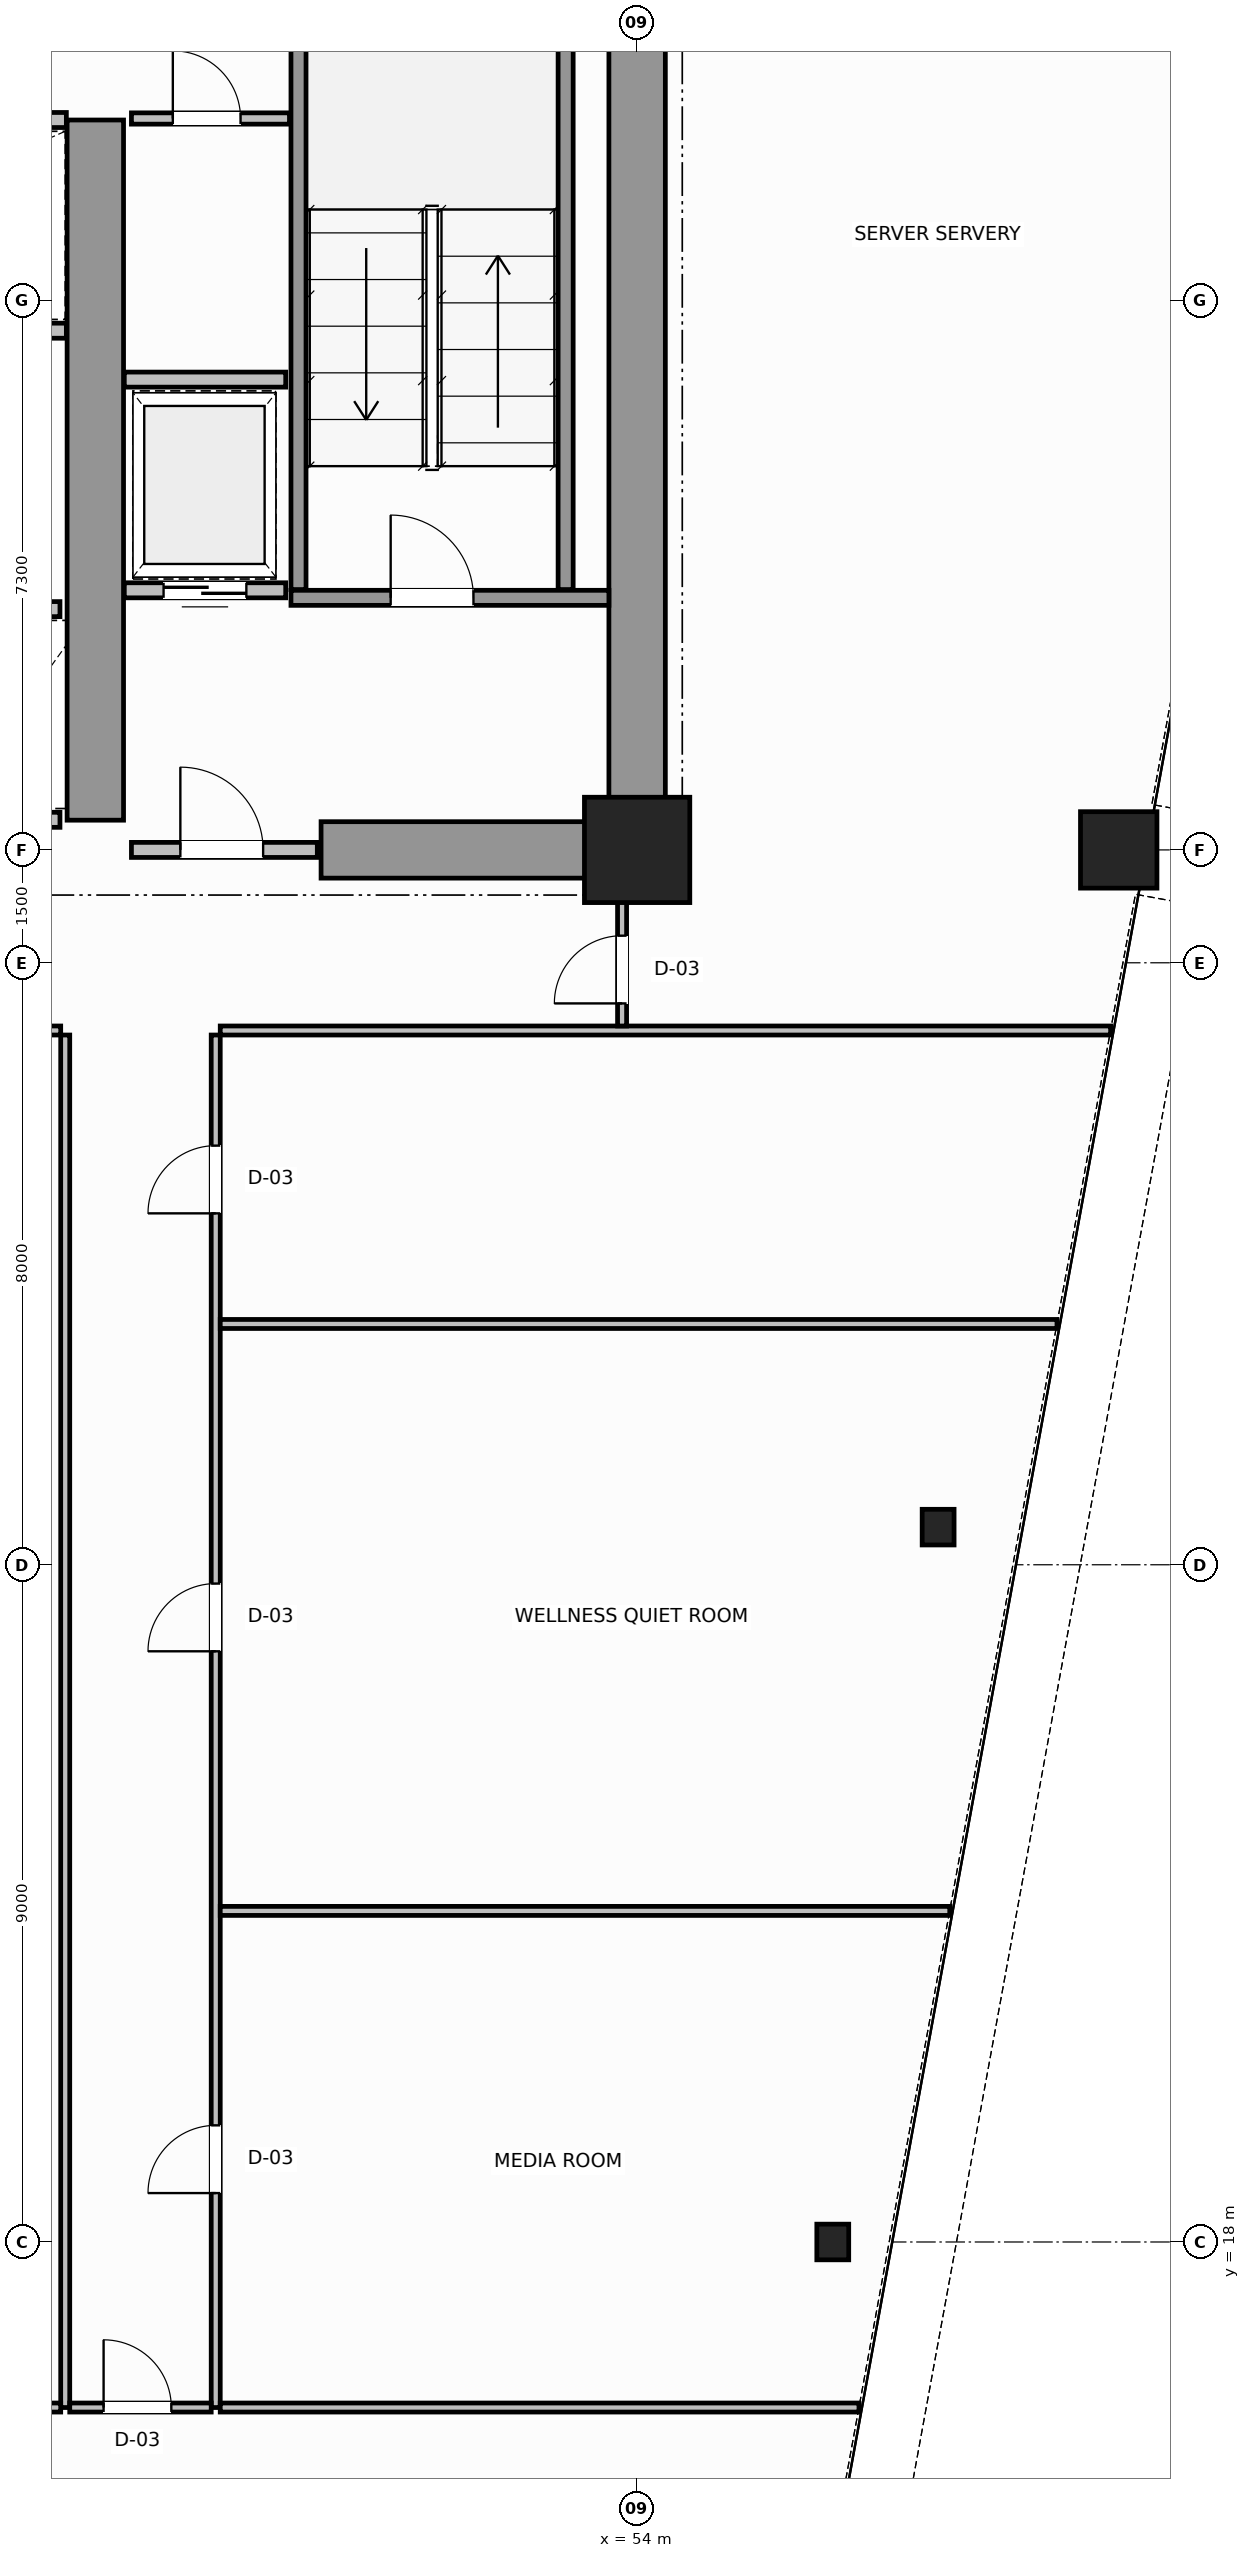
"""IFC4 building model, lengths in metres.
Left out: names, types, materials, properties, quantities, classifications, styles, units other than length and angle.
Written with IfcOpenShell. Run it as: python <this file> out.ifc"""

import sys

from ifc_helpers import new_model, si_unit, direction, frame, frame_2d, origin, origin_2d, place, context, subcontext, project, spatial, rectangle, hollow_circle, i_section, extrude, source, transform, mapped, element, fill, save


model = new_model("IFC4")
c1 = context("Model", 3, precision=1e-05, world=origin(), true_north=direction((0.0, 1.0)))
c2 = subcontext(c1, "Body", "Model", "MODEL_VIEW")
j1 = project(units=[si_unit("LENGTHUNIT", "METRE"), si_unit("PLANEANGLEUNIT", "RADIAN")], contexts=[c1])
p1 = place(None, origin())
s1 = spatial("IfcSite", under=j1, at=p1, CompositionType="ELEMENT")
p2 = place(p1, origin())
s2 = spatial("IfcBuilding", under=s1, at=p2, CompositionType="ELEMENT")
p3 = place(p2, frame((0.0, 0.0, 88.2)))
s3 = spatial("IfcBuildingStorey", under=s2, at=p3, CompositionType="ELEMENT", Elevation=88.2)
m1 = source(origin(), c2, "Body", "SweptSolid", [
    extrude(rectangle(XDim=1.4, YDim=1.4, at=origin_2d()), origin(), (0.0, 0.0, 1.0), 3.8),
])
p4 = place(p3, frame((54.0, 36.5, 0.0), z_axis=(0.0, 0.0, 1.0), x_axis=(1.0, 0.0, 0.0)))
e1 = element("IfcColumn", 1, at=p4, inside=s3, PredefinedType="COLUMN", context=c2, shape_type="MappedRepresentation", body=[
    mapped(m1, transform((0.0, 0.0, 0.0), scale=1.0)),
])
m2 = source(origin(), c2, "Body", "SweptSolid", [
    extrude(hollow_circle(Radius=0.508, WallThickness=0.045, at=origin_2d()), origin(), (0.0, 0.0, 1.0), 3.8),
])
p5 = place(p3, frame((60.4, 36.5, 0.0), z_axis=(0.0, 0.0, 1.0), x_axis=(1.0, 0.0, 0.0)))
e2 = element("IfcColumn", 2, at=p5, inside=s3, PredefinedType="COLUMN", context=c2, shape_type="MappedRepresentation", body=[
    mapped(m2, transform((0.0, 0.0, 0.0), scale=1.0)),
])
m3 = source(origin(), c2, "Body", "SweptSolid", [
    extrude(i_section(OverallWidth=0.424, OverallDepth=0.474, WebThickness=0.047, FlangeThickness=0.065, FilletRadius=0.015, at=origin_2d()), origin(), (0.0, 0.0, 1.0), 3.8),
])
for number, where, z_axis, x_axis in (
    (3, (58.0, 27.5, 0.0), (0.0, 0.0, 1.0), (1.0, 0.0, 0.0)),
    (4, (56.6, 18.0, 0.0), (0.0, 0.0, 1.0), (1.0, 0.0, 0.0)),
):
    element("IfcColumn", number, at=place(p3, frame(where, z_axis=z_axis, x_axis=x_axis)), inside=s3, PredefinedType="COLUMN", context=c2, shape_type="MappedRepresentation", body=[
        mapped(m3, transform((0.0, 0.0, 0.0), scale=1.0)),
    ])
p6 = place(p3, frame((54.0, 36.5, 0.0), z_axis=(0.0, 0.0, 1.0), x_axis=(0.0, 1.0, 0.0)))
e5 = element("IfcWall", 5, at=p6, inside=s3, PredefinedType="SHEAR", context=c2, shape_type="SweptSolid", body=[
    extrude(rectangle(XDim=14.5, YDim=0.75, at=frame_2d((7.25, 0.0))), origin(), (0.0, 0.0, 1.0), 3.8),
])
p7 = place(p3, frame((49.8, 36.5, 0.0), z_axis=(0.0, 0.0, 1.0), x_axis=(1.0, 0.0, 0.0)))
e6 = element("IfcWall", 6, at=p7, inside=s3, PredefinedType="SHEAR", context=c2, shape_type="SweptSolid", body=[
    extrude(rectangle(XDim=3.805, YDim=0.75, at=frame_2d((1.902, 0.0))), origin(), (0.0, 0.0, 1.0), 2.38),
])
p8 = place(p3, frame((46.8, 36.895, 0.0), z_axis=(0.0, 0.0, 1.0), x_axis=(0.0, 1.0, 0.0)))
e7 = element("IfcWall", 7, at=p8, inside=s3, PredefinedType="SHEAR", context=c2, shape_type="SweptSolid", body=[
    extrude(rectangle(XDim=9.305, YDim=0.75, at=frame_2d((4.652, 0.0))), origin(), (0.0, 0.0, 1.0), 3.8),
])
p9 = place(p3, frame((49.4, 39.85, 0.0), z_axis=(0.0, 0.0, 1.0), x_axis=(1.0, 0.0, 0.0)))
e8 = element("IfcWall", 8, at=p9, inside=s3, PredefinedType="SOLIDWALL", context=c2, shape_type="SweptSolid", body=[
    extrude(rectangle(XDim=4.225, YDim=0.2, at=frame_2d((2.113, 0.0))), origin(), (0.0, 0.0, 1.0), 3.8),
])
p10 = place(p9, frame((1.325, 0.0, 0.0)))
e9 = element("IfcOpeningElement", 9, at=p10, cuts=e8, PredefinedType="OPENING", context=c2, shape_type="SweptSolid", body=[
    extrude(rectangle(XDim=1.1, YDim=2.15, at=frame_2d((0.55, 1.075))), frame((0.0, 0.11, 0.0), z_axis=(0.0, -1.0, 0.0), x_axis=(1.0, 0.0, 0.0)), (0.0, 0.0, 1.0), 0.22),
])
for number, where, z_axis, x_axis in (
    (10, (49.5, 39.96, 0.0), (0.0, 0.0, 1.0), (0.0, 1.0, 0.0)),
    (11, (53.05, 39.96, 0.0), (0.0, 0.0, 1.0), (0.0, 1.0, 0.0)),
):
    element("IfcWall", number, at=place(p3, frame(where, z_axis=z_axis, x_axis=x_axis)), inside=s3, PredefinedType="SOLIDWALL", context=c2, shape_type="SweptSolid", body=[
        extrude(rectangle(XDim=9.93, YDim=0.2, at=frame_2d((4.965, 0.0))), origin(), (0.0, 0.0, 1.0), 3.8),
    ])
p11 = place(p3, frame((47.28, 36.5, 0.0), z_axis=(0.0, 0.0, 1.0), x_axis=(1.0, 0.0, 0.0)))
e12 = element("IfcWall", 12, at=p11, inside=s3, PredefinedType="SOLIDWALL", context=c2, shape_type="SweptSolid", body=[
    extrude(rectangle(XDim=2.47, YDim=0.2, at=frame_2d((1.235, 0.0))), origin(), (0.0, 0.0, 1.0), 2.37),
])
p12 = place(p11, frame((0.65, 0.0, 0.0)))
e13 = element("IfcOpeningElement", 13, at=p12, cuts=e12, PredefinedType="OPENING", context=c2, shape_type="SweptSolid", body=[
    extrude(rectangle(XDim=1.1, YDim=2.15, at=frame_2d((0.55, 1.075))), frame((0.0, 0.11, 0.0), z_axis=(0.0, -1.0, 0.0), x_axis=(1.0, 0.0, 0.0)), (0.0, 0.0, 1.0), 0.22),
])
p13 = place(p3, frame((44.37, 39.7, 0.0), z_axis=(0.0, 0.0, 1.0), x_axis=(1.0, 0.0, 0.0)))
e14 = element("IfcWall", 14, at=p13, inside=s3, PredefinedType="SOLIDWALL", context=c2, shape_type="SweptSolid", body=[
    extrude(rectangle(XDim=1.96, YDim=0.2, at=frame_2d((0.98, 0.0))), origin(), (0.0, 0.0, 1.0), 3.58),
])
p14 = place(p3, frame((44.37, 36.9, 0.0), z_axis=(0.0, 0.0, 1.0), x_axis=(1.0, 0.0, 0.0)))
e15 = element("IfcWall", 15, at=p14, inside=s3, PredefinedType="SOLIDWALL", context=c2, shape_type="SweptSolid", body=[
    extrude(rectangle(XDim=1.96, YDim=0.2, at=frame_2d((0.98, 0.0))), origin(), (0.0, 0.0, 1.0), 2.37),
])
for number, where, z_axis, x_axis in (
    (16, (44.62, 43.4, 0.0), (0.0, 0.0, 1.0), (1.0, 0.0, 0.0)),
    (17, (44.62, 46.2, 0.0), (0.0, 0.0, 1.0), (1.0, 0.0, 0.0)),
):
    element("IfcWall", number, at=place(p3, frame(where, z_axis=z_axis, x_axis=x_axis)), inside=s3, PredefinedType="SOLIDWALL", context=c2, shape_type="SweptSolid", body=[
        extrude(rectangle(XDim=1.795, YDim=0.2, at=frame_2d((0.897, 0.0))), origin(), (0.0, 0.0, 1.0), 3.58),
    ])
p15 = place(p3, frame((47.185, 39.95, 0.0), z_axis=(0.0, 0.0, 1.0), x_axis=(1.0, 0.0, 0.0)))
e18 = element("IfcWall", 18, at=p15, inside=s3, PredefinedType="SOLIDWALL", context=c2, shape_type="SweptSolid", body=[
    extrude(rectangle(XDim=2.145, YDim=0.2, at=frame_2d((1.073, 0.0))), origin(), (0.0, 0.0, 1.0), 3.58),
])
p16 = place(p15, frame((0.522, 0.0, 0.0)))
e19 = element("IfcOpeningElement", 19, at=p16, cuts=e18, PredefinedType="OPENING", context=c2, shape_type="SweptSolid", body=[
    extrude(rectangle(XDim=1.1, YDim=2.15, at=frame_2d((0.55, 1.075))), frame((0.0, 0.11, 0.0), z_axis=(0.0, -1.0, 0.0), x_axis=(1.0, 0.0, 0.0)), (0.0, 0.0, 1.0), 0.22),
])
p17 = place(p3, frame((47.185, 42.75, 0.0), z_axis=(0.0, 0.0, 1.0), x_axis=(1.0, 0.0, 0.0)))
e20 = element("IfcWall", 20, at=p17, inside=s3, PredefinedType="SOLIDWALL", context=c2, shape_type="SweptSolid", body=[
    extrude(rectangle(XDim=2.145, YDim=0.2, at=frame_2d((1.073, 0.0))), origin(), (0.0, 0.0, 1.0), 3.58),
])
p18 = place(p3, frame((47.28, 46.22, 0.0), z_axis=(0.0, 0.0, 1.0), x_axis=(1.0, 0.0, 0.0)))
e21 = element("IfcWall", 21, at=p18, inside=s3, PredefinedType="PARTITIONING", context=c2, shape_type="SweptSolid", body=[
    extrude(rectangle(XDim=2.1, YDim=0.15, at=frame_2d((1.05, 0.0))), origin(), (0.0, 0.0, 1.0), 3.58),
])
p19 = place(p18, frame((0.55, 0.0, 0.0)))
e22 = element("IfcOpeningElement", 22, at=p19, cuts=e21, PredefinedType="OPENING", context=c2, shape_type="SweptSolid", body=[
    extrude(rectangle(XDim=0.9, YDim=2.1, at=frame_2d((0.45, 1.05))), frame((0.0, 0.085, 0.0), z_axis=(0.0, -1.0, 0.0), x_axis=(1.0, 0.0, 0.0)), (0.0, 0.0, 1.0), 0.17),
])
p20 = place(p3, frame((21.66, 34.1, 0.0), z_axis=(0.0, 0.0, 1.0), x_axis=(1.0, 0.0, 0.0)))
e23 = element("IfcWall", 23, at=p20, inside=s3, PredefinedType="PARTITIONING", context=c2, shape_type="SweptSolid", body=[
    extrude(rectangle(XDim=24.68, YDim=0.12, at=frame_2d((12.34, 0.0))), origin(), (0.0, 0.0, 1.0), 3.58),
])
p21 = place(p20, frame((1.79, 0.0, 0.0)))
e24 = element("IfcOpeningElement", 24, at=p21, cuts=e23, PredefinedType="OPENING", context=c2, shape_type="SweptSolid", body=[
    extrude(rectangle(XDim=0.9, YDim=2.15, at=frame_2d((0.45, 1.075))), frame((0.0, 0.07, 0.0), z_axis=(0.0, -1.0, 0.0), x_axis=(1.0, 0.0, 0.0)), (0.0, 0.0, 1.0), 0.14),
])
p22 = place(p20, frame((14.19, 0.0, 0.0)))
e25 = element("IfcOpeningElement", 25, at=p22, cuts=e23, PredefinedType="OPENING", context=c2, shape_type="SweptSolid", body=[
    extrude(rectangle(XDim=0.9, YDim=2.15, at=frame_2d((0.45, 1.075))), frame((0.0, 0.07, 0.0), z_axis=(0.0, -1.0, 0.0), x_axis=(1.0, 0.0, 0.0)), (0.0, 0.0, 1.0), 0.14),
])
p23 = place(p3, frame((48.46, 34.1, 0.0), z_axis=(0.0, 0.0, 1.0), x_axis=(1.0, 0.0, 0.0)))
e26 = element("IfcWall", 26, at=p23, inside=s3, PredefinedType="PARTITIONING", context=c2, shape_type="SweptSolid", body=[
    extrude(rectangle(XDim=11.832, YDim=0.12, at=frame_2d((5.916, 0.0))), origin(), (0.0, 0.0, 1.0), 3.58),
])
p24 = place(p3, frame((53.8, 34.16, 0.0), z_axis=(0.0, 0.0, 1.0), x_axis=(0.0, 1.0, 0.0)))
e27 = element("IfcWall", 27, at=p24, inside=s3, PredefinedType="PARTITIONING", context=c2, shape_type="SweptSolid", body=[
    extrude(rectangle(XDim=2.28, YDim=0.12, at=frame_2d((1.14, 0.0))), origin(), (0.0, 0.0, 1.0), 3.58),
])
p25 = place(p24, frame((0.3, 0.0, 0.0)))
e28 = element("IfcOpeningElement", 28, at=p25, cuts=e27, PredefinedType="OPENING", context=c2, shape_type="SweptSolid", body=[
    extrude(rectangle(XDim=0.9, YDim=2.15, at=frame_2d((0.45, 1.075))), frame((0.0, 0.07, 0.0), z_axis=(0.0, -1.0, 0.0), x_axis=(1.0, 0.0, 0.0)), (0.0, 0.0, 1.0), 0.14),
])
p26 = place(p3, frame((46.4, 15.8, 0.0), z_axis=(0.0, 0.0, 1.0), x_axis=(0.0, 1.0, 0.0)))
e29 = element("IfcWall", 29, at=p26, inside=s3, PredefinedType="PARTITIONING", context=c2, shape_type="SweptSolid", body=[
    extrude(rectangle(XDim=18.24, YDim=0.12, at=frame_2d((9.12, 0.0))), origin(), (0.0, 0.0, 1.0), 3.58),
])
p27 = place(p3, frame((48.4, 15.8, 0.0), z_axis=(0.0, 0.0, 1.0), x_axis=(0.0, 1.0, 0.0)))
e30 = element("IfcWall", 30, at=p27, inside=s3, PredefinedType="PARTITIONING", context=c2, shape_type="SweptSolid", body=[
    extrude(rectangle(XDim=18.24, YDim=0.12, at=frame_2d((9.12, 0.0))), origin(), (0.0, 0.0, 1.0), 3.58),
])
p28 = place(p27, frame((2.85, 0.0, 0.0)))
e31 = element("IfcOpeningElement", 31, at=p28, cuts=e30, PredefinedType="OPENING", context=c2, shape_type="SweptSolid", body=[
    extrude(rectangle(XDim=0.9, YDim=2.15, at=frame_2d((0.45, 1.075))), frame((0.0, 0.07, 0.0), z_axis=(0.0, -1.0, 0.0), x_axis=(1.0, 0.0, 0.0)), (0.0, 0.0, 1.0), 0.14),
])
p29 = place(p27, frame((10.05, 0.0, 0.0)))
e32 = element("IfcOpeningElement", 32, at=p29, cuts=e30, PredefinedType="OPENING", context=c2, shape_type="SweptSolid", body=[
    extrude(rectangle(XDim=0.9, YDim=2.15, at=frame_2d((0.45, 1.075))), frame((0.0, 0.07, 0.0), z_axis=(0.0, -1.0, 0.0), x_axis=(1.0, 0.0, 0.0)), (0.0, 0.0, 1.0), 0.14),
])
p30 = place(p27, frame((15.87, 0.0, 0.0)))
e33 = element("IfcOpeningElement", 33, at=p30, cuts=e30, PredefinedType="OPENING", context=c2, shape_type="SweptSolid", body=[
    extrude(rectangle(XDim=0.9, YDim=2.15, at=frame_2d((0.45, 1.075))), frame((0.0, 0.07, 0.0), z_axis=(0.0, -1.0, 0.0), x_axis=(1.0, 0.0, 0.0)), (0.0, 0.0, 1.0), 0.14),
])
p31 = place(p3, frame((46.46, 15.8, 0.0), z_axis=(0.0, 0.0, 1.0), x_axis=(1.0, 0.0, 0.0)))
e34 = element("IfcWall", 34, at=p31, inside=s3, PredefinedType="PARTITIONING", context=c2, shape_type="SweptSolid", body=[
    extrude(rectangle(XDim=1.88, YDim=0.12, at=frame_2d((0.94, 0.0))), origin(), (0.0, 0.0, 1.0), 3.58),
])
p32 = place(p31, frame((0.45, 0.0, 0.0)))
e35 = element("IfcOpeningElement", 35, at=p32, cuts=e34, PredefinedType="OPENING", context=c2, shape_type="SweptSolid", body=[
    extrude(rectangle(XDim=0.9, YDim=2.15, at=frame_2d((0.45, 1.075))), frame((0.0, 0.07, 0.0), z_axis=(0.0, -1.0, 0.0), x_axis=(1.0, 0.0, 0.0)), (0.0, 0.0, 1.0), 0.14),
])
p33 = place(p3, frame((48.46, 15.8, 0.0), z_axis=(0.0, 0.0, 1.0), x_axis=(1.0, 0.0, 0.0)))
e36 = element("IfcWall", 36, at=p33, inside=s3, PredefinedType="PARTITIONING", context=c2, shape_type="SweptSolid", body=[
    extrude(rectangle(XDim=8.488, YDim=0.12, at=frame_2d((4.244, 0.0))), origin(), (0.0, 0.0, 1.0), 3.58),
])
p34 = place(p3, frame((48.46, 22.4, 0.0), z_axis=(0.0, 0.0, 1.0), x_axis=(1.0, 0.0, 0.0)))
e37 = element("IfcWall", 37, at=p34, inside=s3, PredefinedType="PARTITIONING", context=c2, shape_type="SweptSolid", body=[
    extrude(rectangle(XDim=9.694, YDim=0.12, at=frame_2d((4.847, 0.0))), origin(), (0.0, 0.0, 1.0), 3.58),
])
p35 = place(p3, frame((48.46, 30.2, 0.0), z_axis=(0.0, 0.0, 1.0), x_axis=(1.0, 0.0, 0.0)))
e38 = element("IfcWall", 38, at=p35, inside=s3, PredefinedType="PARTITIONING", context=c2, shape_type="SweptSolid", body=[
    extrude(rectangle(XDim=11.12, YDim=0.12, at=frame_2d((5.56, 0.0))), origin(), (0.0, 0.0, 1.0), 3.07),
])
p36 = place(p3, frame((21.66, 15.8, 0.0), z_axis=(0.0, 0.0, 1.0), x_axis=(1.0, 0.0, 0.0)))
e39 = element("IfcWall", 39, at=p36, inside=s3, PredefinedType="PARTITIONING", context=c2, shape_type="SweptSolid", body=[
    extrude(rectangle(XDim=24.68, YDim=0.12, at=frame_2d((12.34, 0.0))), origin(), (0.0, 0.0, 1.0), 3.58),
])
m4 = source(origin(), c2, "Body", "SweptSolid", [
    extrude(rectangle(XDim=1.1, YDim=2.15, at=frame_2d((0.55, 1.075))), frame((0.0, 0.025, 0.0), z_axis=(0.0, -1.0, 0.0), x_axis=(1.0, 0.0, 0.0)), (0.0, 0.0, 1.0), 0.05),
])
p37 = place(p10, origin())
e40 = element("IfcDoor", 40, at=p37, inside=s3, OperationType="SINGLE_SWING_RIGHT", PredefinedType="DOOR", context=c2, shape_type="MappedRepresentation", body=[
    mapped(m4, transform((0.0, 0.0, 0.0), scale=1.0)),
])
fill(e9, e40)
p38 = place(p12, origin())
e41 = element("IfcDoor", 41, at=p38, inside=s3, OperationType="SINGLE_SWING_LEFT", PredefinedType="DOOR", context=c2, shape_type="MappedRepresentation", body=[
    mapped(m4, transform((0.0, 0.0, 0.0), scale=1.0)),
])
fill(e13, e41)
p39 = place(p16, origin())
e42 = element("IfcDoor", 42, at=p39, inside=s3, OperationType="DOUBLE_DOOR_SLIDING", PredefinedType="DOOR", context=c2, shape_type="MappedRepresentation", body=[
    mapped(m4, transform((0.0, 0.0, 0.0), scale=1.0)),
])
fill(e19, e42)
m5 = source(origin(), c2, "Body", "SweptSolid", [
    extrude(rectangle(XDim=0.9, YDim=2.1, at=frame_2d((0.45, 1.05))), frame((0.0, 0.025, 0.0), z_axis=(0.0, -1.0, 0.0), x_axis=(1.0, 0.0, 0.0)), (0.0, 0.0, 1.0), 0.05),
])
p40 = place(p19, origin())
e43 = element("IfcDoor", 43, at=p40, inside=s3, OperationType="SINGLE_SWING_RIGHT", PredefinedType="DOOR", context=c2, shape_type="MappedRepresentation", body=[
    mapped(m5, transform((0.0, 0.0, 0.0), scale=1.0)),
])
fill(e22, e43)
m6 = source(origin(), c2, "Body", "SweptSolid", [
    extrude(rectangle(XDim=0.9, YDim=2.15, at=frame_2d((0.45, 1.075))), frame((0.0, 0.025, 0.0), z_axis=(0.0, -1.0, 0.0), x_axis=(1.0, 0.0, 0.0)), (0.0, 0.0, 1.0), 0.05),
])
p41 = place(p25, origin())
e44 = element("IfcDoor", 44, at=p41, inside=s3, OperationType="SINGLE_SWING_RIGHT", PredefinedType="DOOR", context=c2, shape_type="MappedRepresentation", body=[
    mapped(m6, transform((0.0, 0.0, 0.0), scale=1.0)),
])
fill(e28, e44)
p42 = place(p28, origin())
e45 = element("IfcDoor", 45, at=p42, inside=s3, OperationType="SINGLE_SWING_RIGHT", PredefinedType="DOOR", context=c2, shape_type="MappedRepresentation", body=[
    mapped(m6, transform((0.0, 0.0, 0.0), scale=1.0)),
])
fill(e31, e45)
p43 = place(p29, origin())
e46 = element("IfcDoor", 46, at=p43, inside=s3, OperationType="SINGLE_SWING_LEFT", PredefinedType="DOOR", context=c2, shape_type="MappedRepresentation", body=[
    mapped(m6, transform((0.0, 0.0, 0.0), scale=1.0)),
])
fill(e32, e46)
p44 = place(p30, origin())
e47 = element("IfcDoor", 47, at=p44, inside=s3, OperationType="SINGLE_SWING_RIGHT", PredefinedType="DOOR", context=c2, shape_type="MappedRepresentation", body=[
    mapped(m6, transform((0.0, 0.0, 0.0), scale=1.0)),
])
fill(e33, e47)
p45 = place(p32, origin())
e48 = element("IfcDoor", 48, at=p45, inside=s3, OperationType="SINGLE_SWING_RIGHT", PredefinedType="DOOR", context=c2, shape_type="MappedRepresentation", body=[
    mapped(m6, transform((0.0, 0.0, 0.0), scale=1.0)),
])
fill(e35, e48)
save(model, sys.argv[1])
